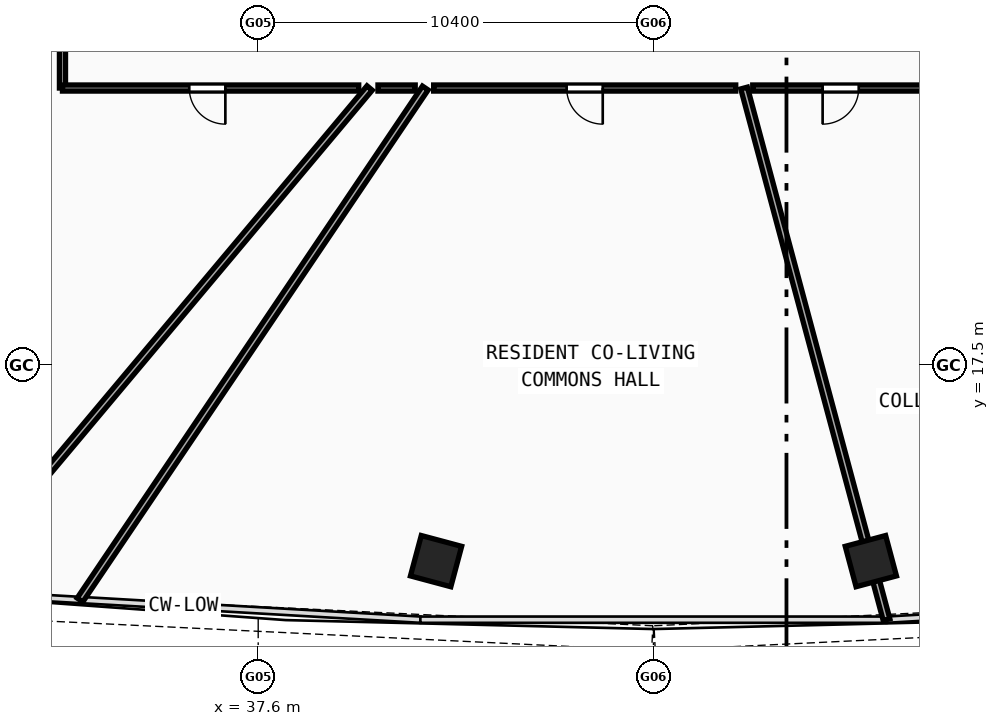
"""IFC4 building model, lengths in metres.
Left out: names, types, materials, properties, quantities, classifications, styles, units other than length and angle.
Written with IfcOpenShell. Run it as: python <this file> out.ifc"""

import sys

from ifc_helpers import new_model, si_unit, direction, frame, frame_2d, origin, origin_with_axes, origin_2d, place, context, subcontext, project, spatial, rectangle, hollow_rectangle, extrude, source, transform, mapped, element, fill, save


model = new_model("IFC4")
c1 = context("Model", 3, precision=1e-05, world=origin(), true_north=direction((0.0, 1.0)))
c2 = subcontext(c1, "Body", "Model", "MODEL_VIEW")
j1 = project(units=[si_unit("LENGTHUNIT", "METRE"), si_unit("PLANEANGLEUNIT", "RADIAN")], contexts=[c1])
p1 = place(None, origin())
s1 = spatial("IfcSite", under=j1, at=p1, CompositionType="ELEMENT")
p2 = place(p1, origin())
s2 = spatial("IfcBuilding", under=s1, at=p2, CompositionType="ELEMENT")
p3 = place(p2, frame((0.0, 0.0, 48.55)))
s3 = spatial("IfcBuildingStorey", under=s2, at=p3, CompositionType="ELEMENT", Elevation=48.55)
m1 = source(origin(), c2, "Body", "SweptSolid", [
    extrude(hollow_rectangle(XDim=1.1, YDim=1.1, WallThickness=0.045, at=origin_2d()), origin(), (0.0, 0.0, 1.0), 3.63),
])
for number, where, z_axis, x_axis in (
    (1, (42.28, 12.352, -0.26), (0.0, 0.0, 1.0), (0.966, -0.259, 0.0)),
    (2, (53.72, 12.352, -0.26), (0.0, 0.0, 1.0), (0.966, 0.259, 0.0)),
):
    element("IfcColumn", number, at=place(p3, frame(where, z_axis=z_axis, x_axis=x_axis)), inside=s3, PredefinedType="COLUMN", context=c2, shape_type="MappedRepresentation", body=[
        mapped(m1, transform((0.0, 0.0, 0.0), scale=1.0)),
    ])
p4 = place(p3, frame((40.532, 24.8, 0.0), z_axis=(0.0, 0.0, 1.0), x_axis=(-0.642784696521, -0.766046887546, 0.0)))
e3 = element("IfcWall", 3, at=p4, inside=s3, PredefinedType="PARTITIONING", context=c2, shape_type="SweptSolid", body=[
    extrude(rectangle(XDim=17.319, YDim=0.18, at=frame_2d((8.659, 0.0))), origin(), (0.0, 0.0, 1.0), 2.67),
])
p5 = place(p3, frame((41.997, 24.8, 0.0), z_axis=(0.0, 0.0, 1.0), x_axis=(-0.559182499599, -0.82904458996, 0.0)))
e4 = element("IfcWall", 4, at=p5, inside=s3, PredefinedType="PARTITIONING", context=c2, shape_type="SweptSolid", body=[
    extrude(rectangle(XDim=16.248, YDim=0.18, at=frame_2d((8.124, 0.0))), origin(), (0.0, 0.0, 1.0), 2.67),
])
p6 = place(p3, frame((50.385, 24.8, 0.0), z_axis=(0.0, 0.0, 1.0), x_axis=(0.258819787056, -0.965925627483, 0.0)))
e5 = element("IfcWall", 5, at=p6, inside=s3, PredefinedType="PARTITIONING", context=c2, shape_type="SweptSolid", body=[
    extrude(rectangle(XDim=14.482, YDim=0.18, at=frame_2d((7.241, 0.0))), origin(), (0.0, 0.0, 1.0), 2.67),
])
p7 = place(p3, frame((32.45, 24.8, 0.0), z_axis=(0.0, 0.0, 1.0), x_axis=(0.0, 1.0, 0.0)))
e6 = element("IfcWall", 6, at=p7, inside=s3, PredefinedType="PARTITIONING", context=c2, shape_type="SweptSolid", body=[
    extrude(rectangle(XDim=5.935, YDim=0.16, at=frame_2d((2.967, 0.0))), origin(), (0.0, 0.0, 1.0), 2.97),
])
p8 = place(p3, frame((55.248, 24.8, 0.0), z_axis=(0.0, 0.0, 1.0), x_axis=(-1.0, 0.0, 0.0)))
e7 = element("IfcWall", 7, at=p8, inside=s3, PredefinedType="PARTITIONING", context=c2, shape_type="SweptSolid", body=[
    extrude(rectangle(XDim=4.635, YDim=0.16, at=frame_2d((2.318, 0.0))), origin(), (0.0, 0.0, 1.0), 2.67),
])
p9 = place(p8, frame((1.847, 0.0, 0.0)))
e8 = element("IfcOpeningElement", 8, at=p9, cuts=e7, PredefinedType="OPENING", context=c2, shape_type="SweptSolid", body=[
    extrude(rectangle(XDim=0.95, YDim=2.1, at=frame_2d((0.475, 1.05))), frame((0.0, 0.09, 0.0), z_axis=(0.0, -1.0, 0.0), x_axis=(1.0, 0.0, 0.0)), (0.0, 0.0, 1.0), 0.18),
])
p10 = place(p3, frame((50.165, 24.8, 0.0), z_axis=(0.0, 0.0, 1.0), x_axis=(-1.0, 0.0, 0.0)))
e9 = element("IfcWall", 9, at=p10, inside=s3, PredefinedType="PARTITIONING", context=c2, shape_type="SweptSolid", body=[
    extrude(rectangle(XDim=7.948, YDim=0.16, at=frame_2d((3.974, 0.0))), origin(), (0.0, 0.0, 1.0), 2.67),
])
p11 = place(p10, frame((3.499, 0.0, 0.0)))
e10 = element("IfcOpeningElement", 10, at=p11, cuts=e9, PredefinedType="OPENING", context=c2, shape_type="SweptSolid", body=[
    extrude(rectangle(XDim=0.95, YDim=2.1, at=frame_2d((0.475, 1.05))), frame((0.0, 0.09, 0.0), z_axis=(0.0, -1.0, 0.0), x_axis=(1.0, 0.0, 0.0)), (0.0, 0.0, 1.0), 0.18),
])
p12 = place(p3, frame((41.731, 24.8, 0.0), z_axis=(0.0, 0.0, 1.0), x_axis=(-1.0, 0.0, 0.0)))
e11 = element("IfcWall", 11, at=p12, inside=s3, PredefinedType="PARTITIONING", context=c2, shape_type="SweptSolid", body=[
    extrude(rectangle(XDim=0.979, YDim=0.16, at=frame_2d((0.49, 0.0))), origin(), (0.0, 0.0, 1.0), 2.67),
])
p13 = place(p3, frame((40.245, 24.8, 0.0), z_axis=(0.0, 0.0, 1.0), x_axis=(-1.0, 0.0, 0.0)))
e12 = element("IfcWall", 12, at=p13, inside=s3, PredefinedType="PARTITIONING", context=c2, shape_type="SweptSolid", body=[
    extrude(rectangle(XDim=7.795, YDim=0.16, at=frame_2d((3.897, 0.0))), origin(), (0.0, 0.0, 1.0), 2.97),
])
p14 = place(p13, frame((3.509, 0.0, 0.0)))
e13 = element("IfcOpeningElement", 13, at=p14, cuts=e12, PredefinedType="OPENING", context=c2, shape_type="SweptSolid", body=[
    extrude(rectangle(XDim=0.95, YDim=2.1, at=frame_2d((0.475, 1.05))), frame((0.0, 0.09, 0.0), z_axis=(0.0, -1.0, 0.0), x_axis=(1.0, 0.0, 0.0)), (0.0, 0.0, 1.0), 0.18),
])
m2 = source(origin(), c2, "Body", "SweptSolid", [
    extrude(rectangle(XDim=0.95, YDim=2.1, at=frame_2d((0.475, 1.05))), frame((0.0, 0.025, 0.0), z_axis=(0.0, -1.0, 0.0), x_axis=(1.0, 0.0, 0.0)), (0.0, 0.0, 1.0), 0.05),
])
p15 = place(p14, origin_with_axes())
e14 = element("IfcDoor", 14, at=p15, inside=s3, OperationType="SINGLE_SWING_LEFT", PredefinedType="DOOR", context=c2, shape_type="MappedRepresentation", body=[
    mapped(m2, transform((0.0, 0.0, 0.0), scale=1.0)),
])
fill(e13, e14)
p16 = place(p11, origin_with_axes())
e15 = element("IfcDoor", 15, at=p16, inside=s3, OperationType="SINGLE_SWING_LEFT", PredefinedType="DOOR", context=c2, shape_type="MappedRepresentation", body=[
    mapped(m2, transform((0.0, 0.0, 0.0), scale=1.0)),
])
fill(e10, e15)
p17 = place(p9, origin_with_axes())
e16 = element("IfcDoor", 16, at=p17, inside=s3, OperationType="SINGLE_SWING_RIGHT", PredefinedType="DOOR", context=c2, shape_type="MappedRepresentation", body=[
    mapped(m2, transform((0.0, 0.0, 0.0), scale=1.0)),
])
fill(e8, e16)
save(model, sys.argv[1])
